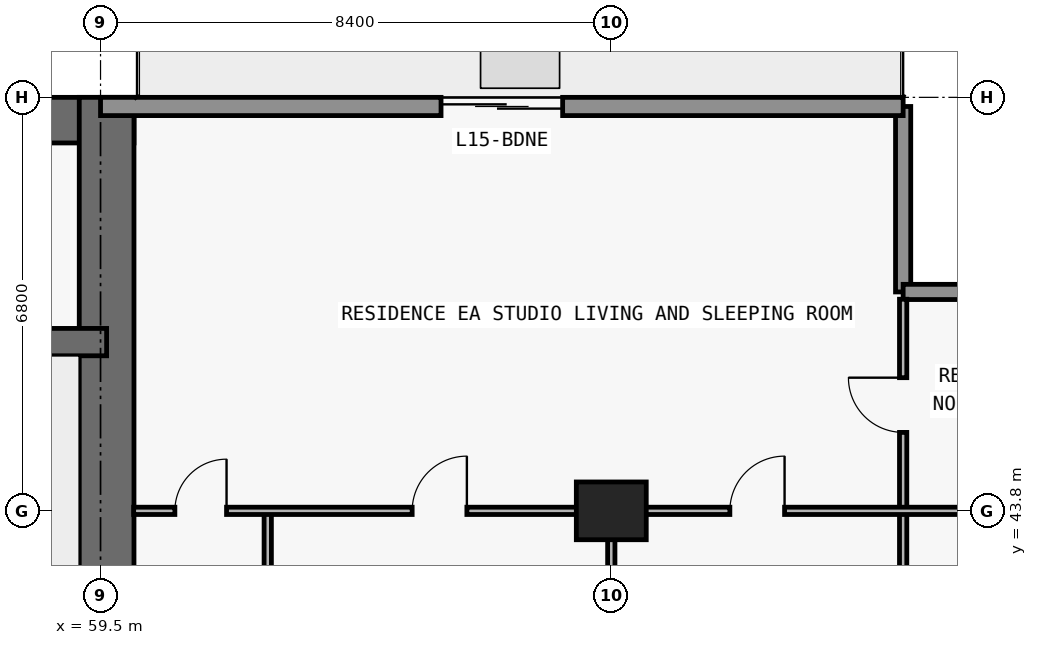
"""IFC4 building model, lengths in metres.
Left out: names, types, materials, properties, quantities, classifications, styles, units other than length and angle.
Written with IfcOpenShell. Run it as: python <this file> out.ifc"""

import sys

from ifc_helpers import new_model, si_unit, direction, frame, frame_2d, origin, origin_2d, place, context, subcontext, project, spatial, rectangle, extrude, element, fill, save


model = new_model("IFC4")
c1 = context("Model", 3, precision=1e-05, world=origin(), true_north=direction((0.0, 1.0)))
c2 = subcontext(c1, "Body", "Model", "MODEL_VIEW")
j1 = project(units=[si_unit("LENGTHUNIT", "METRE"), si_unit("PLANEANGLEUNIT", "RADIAN")], contexts=[c1])
p1 = place(None, origin())
s1 = spatial("IfcSite", under=j1, at=p1, CompositionType="ELEMENT")
p2 = place(p1, origin())
s2 = spatial("IfcBuilding", under=s1, at=p2, CompositionType="ELEMENT")
p3 = place(p2, frame((0.0, 0.0, 59.7)))
s3 = spatial("IfcBuildingStorey", under=s2, at=p3, CompositionType="ELEMENT", Elevation=59.7)
p4 = place(p3, frame((67.9, 43.8, 0.0), z_axis=(0.0, 0.0, 1.0), x_axis=(1.0, 0.0, 0.0)))
e1 = element("IfcColumn", 1, at=p4, inside=s3, PredefinedType="COLUMN", context=c2, shape_type="SweptSolid", body=[
    extrude(rectangle(XDim=1.15, YDim=0.95, at=origin_2d()), origin(), (0.0, 0.0, 1.0), 3.05),
])
p5 = place(p3, frame((17.75, 50.225, 0.0), z_axis=(0.0, 0.0, 1.0), x_axis=(1.0, 0.0, 0.0)))
e2 = element("IfcWall", 2, at=p5, inside=s3, PredefinedType="SHEAR", context=c2, shape_type="SweptSolid", body=[
    extrude(rectangle(XDim=42.3, YDim=0.75, at=frame_2d((21.15, 0.0))), origin(), (0.0, 0.0, 1.0), 3.05),
])
p6 = place(p3, frame((59.6, 36.45, 0.0), z_axis=(0.0, 0.0, 1.0), x_axis=(0.0, 1.0, 0.0)))
e3 = element("IfcWall", 3, at=p6, inside=s3, PredefinedType="SHEAR", context=c2, shape_type="SweptSolid", body=[
    extrude(rectangle(XDim=14.15, YDim=0.9, at=frame_2d((7.075, 0.0))), origin(), (0.0, 0.0, 1.0), 3.05),
])
p7 = place(p3, frame((18.2, 46.575, 0.0), z_axis=(0.0, 0.0, 1.0), x_axis=(1.0, 0.0, 0.0)))
e4 = element("IfcWall", 4, at=p7, inside=s3, PredefinedType="SHEAR", context=c2, shape_type="SweptSolid", body=[
    extrude(rectangle(XDim=41.4, YDim=0.45, at=frame_2d((20.7, 0.0))), origin(), (0.0, 0.0, 1.0), 3.05),
])
p8 = place(p7, frame((7.7, 0.0, 0.0)))
e5 = element("IfcOpeningElement", 5, at=p8, cuts=e4, PredefinedType="OPENING", context=c2, shape_type="SweptSolid", body=[
    extrude(rectangle(XDim=1.0, YDim=2.2, at=frame_2d((0.5, 1.1))), frame((0.0, 0.235, 0.0), z_axis=(0.0, -1.0, 0.0), x_axis=(1.0, 0.0, 0.0)), (0.0, 0.0, 1.0), 0.47),
])
p9 = place(p7, frame((32.725, 0.0, 0.0)))
e6 = element("IfcOpeningElement", 6, at=p9, cuts=e4, PredefinedType="OPENING", context=c2, shape_type="SweptSolid", body=[
    extrude(rectangle(XDim=1.05, YDim=2.15, at=frame_2d((0.525, 1.075))), frame((0.0, 0.235, 0.0), z_axis=(0.0, -1.0, 0.0), x_axis=(1.0, 0.0, 0.0)), (0.0, 0.0, 1.0), 0.47),
])
p10 = place(p3, frame((72.7, 50.45, 0.0), z_axis=(0.0, 0.0, 1.0), x_axis=(0.0, -1.0, 0.0)))
e7 = element("IfcWall", 7, at=p10, inside=s3, PredefinedType="ELEMENTEDWALL", context=c2, shape_type="SweptSolid", body=[
    extrude(rectangle(XDim=3.05, YDim=0.25, at=frame_2d((1.525, 0.0))), origin(), (0.0, 0.0, 1.0), 3.05),
])
p11 = place(p3, frame((72.7, 47.4, 0.0), z_axis=(0.0, 0.0, 1.0), x_axis=(1.0, 0.0, 0.0)))
e8 = element("IfcWall", 8, at=p11, inside=s3, PredefinedType="ELEMENTEDWALL", context=c2, shape_type="SweptSolid", body=[
    extrude(rectangle(XDim=3.45, YDim=0.25, at=frame_2d((1.725, 0.0))), origin(), (0.0, 0.0, 1.0), 3.05),
])
p12 = place(p3, frame((59.5, 50.45, 0.0), z_axis=(0.0, 0.0, 1.0), x_axis=(1.0, 0.0, 0.0)))
e9 = element("IfcWall", 9, at=p12, inside=s3, PredefinedType="STANDARD", context=c2, shape_type="SweptSolid", body=[
    extrude(rectangle(XDim=13.2, YDim=0.3, at=frame_2d((6.6, 0.0))), origin(), (0.0, 0.0, 1.0), 3.05),
])
p13 = place(p12, frame((5.6, 0.0, 0.0)))
e10 = element("IfcOpeningElement", 10, at=p13, cuts=e9, PredefinedType="OPENING", context=c2, shape_type="SweptSolid", body=[
    extrude(rectangle(XDim=2.0, YDim=2.3, at=frame_2d((1.0, 1.15))), frame((0.0, 0.16, 0.0), z_axis=(0.0, -1.0, 0.0), x_axis=(1.0, 0.0, 0.0)), (0.0, 0.0, 1.0), 0.32),
])
p14 = place(p3, frame((62.25, 36.9, 0.0), z_axis=(0.0, 0.0, 1.0), x_axis=(0.0, 1.0, 0.0)))
e11 = element("IfcWall", 11, at=p14, inside=s3, PredefinedType="PARTITIONING", context=c2, shape_type="SweptSolid", body=[
    extrude(rectangle(XDim=6.9, YDim=0.12, at=frame_2d((3.45, 0.0))), origin(), (0.0, 0.0, 1.0), 3.05),
])
p15 = place(p14, frame((1.231, 0.0, 0.0)))
e12 = element("IfcOpeningElement", 12, at=p15, cuts=e11, PredefinedType="OPENING", context=c2, shape_type="SweptSolid", body=[
    extrude(rectangle(XDim=0.85, YDim=2.1, at=frame_2d((0.425, 1.05))), frame((0.0, 0.07, 0.0), z_axis=(0.0, -1.0, 0.0), x_axis=(1.0, 0.0, 0.0)), (0.0, 0.0, 1.0), 0.14),
])
p16 = place(p3, frame((67.9, 36.9, 0.0), z_axis=(0.0, 0.0, 1.0), x_axis=(0.0, 1.0, 0.0)))
e13 = element("IfcWall", 13, at=p16, inside=s3, PredefinedType="PARTITIONING", context=c2, shape_type="SweptSolid", body=[
    extrude(rectangle(XDim=6.9, YDim=0.12, at=frame_2d((3.45, 0.0))), origin(), (0.0, 0.0, 1.0), 2.11),
])
p17 = place(p3, frame((72.7, 36.905, 0.0), z_axis=(0.0, 0.0, 1.0), x_axis=(0.0, 1.0, 0.0)))
e14 = element("IfcWall", 14, at=p17, inside=s3, PredefinedType="PARTITIONING", context=c2, shape_type="SweptSolid", body=[
    extrude(rectangle(XDim=10.375, YDim=0.12, at=frame_2d((5.188, 0.0))), origin(), (0.0, 0.0, 1.0), 3.05),
])
p18 = place(p17, frame((2.998, 0.0, 0.0)))
e15 = element("IfcOpeningElement", 15, at=p18, cuts=e14, PredefinedType="OPENING", context=c2, shape_type="SweptSolid", body=[
    extrude(rectangle(XDim=0.9, YDim=2.15, at=frame_2d((0.45, 1.075))), frame((0.0, 0.07, 0.0), z_axis=(0.0, -1.0, 0.0), x_axis=(1.0, 0.0, 0.0)), (0.0, 0.0, 1.0), 0.14),
])
p19 = place(p17, frame((8.185, 0.0, 0.0)))
e16 = element("IfcOpeningElement", 16, at=p19, cuts=e14, PredefinedType="OPENING", context=c2, shape_type="SweptSolid", body=[
    extrude(rectangle(XDim=0.9, YDim=2.15, at=frame_2d((0.45, 1.075))), frame((0.0, 0.07, 0.0), z_axis=(0.0, -1.0, 0.0), x_axis=(1.0, 0.0, 0.0)), (0.0, 0.0, 1.0), 0.14),
])
p20 = place(p3, frame((60.045, 43.8, 0.0), z_axis=(0.0, 0.0, 1.0), x_axis=(1.0, 0.0, 0.0)))
e17 = element("IfcWall", 17, at=p20, inside=s3, PredefinedType="PARTITIONING", context=c2, shape_type="SweptSolid", body=[
    extrude(rectangle(XDim=15.96, YDim=0.12, at=frame_2d((7.98, 0.0))), origin(), (0.0, 0.0, 1.0), 2.339),
])
p21 = place(p20, frame((9.805, 0.0, 0.0)))
e18 = element("IfcOpeningElement", 18, at=p21, cuts=e17, PredefinedType="OPENING", context=c2, shape_type="SweptSolid", body=[
    extrude(rectangle(XDim=0.9, YDim=2.15, at=frame_2d((0.45, 1.075))), frame((0.0, 0.07, 0.0), z_axis=(0.0, -1.0, 0.0), x_axis=(1.0, 0.0, 0.0)), (0.0, 0.0, 1.0), 0.14),
])
p22 = place(p20, frame((4.58, 0.0, 0.0)))
e19 = element("IfcOpeningElement", 19, at=p22, cuts=e17, PredefinedType="OPENING", context=c2, shape_type="SweptSolid", body=[
    extrude(rectangle(XDim=0.9, YDim=2.15, at=frame_2d((0.45, 1.075))), frame((0.0, 0.07, 0.0), z_axis=(0.0, -1.0, 0.0), x_axis=(1.0, 0.0, 0.0)), (0.0, 0.0, 1.0), 0.14),
])
p23 = place(p20, frame((0.677, 0.0, 0.0)))
e20 = element("IfcOpeningElement", 20, at=p23, cuts=e17, PredefinedType="OPENING", context=c2, shape_type="SweptSolid", body=[
    extrude(rectangle(XDim=0.85, YDim=2.1, at=frame_2d((0.425, 1.05))), frame((0.0, 0.07, 0.0), z_axis=(0.0, -1.0, 0.0), x_axis=(1.0, 0.0, 0.0)), (0.0, 0.0, 1.0), 0.14),
])
p24 = place(p13, origin())
e21 = element("IfcDoor", 21, at=p24, inside=s3, OperationType="DOUBLE_DOOR_SLIDING", PredefinedType="DOOR", context=c2, shape_type="SweptSolid", body=[
    extrude(rectangle(XDim=2.0, YDim=2.3, at=frame_2d((1.0, 1.15))), frame((0.0, 0.025, 0.0), z_axis=(0.0, -1.0, 0.0), x_axis=(1.0, 0.0, 0.0)), (0.0, 0.0, 1.0), 0.05),
])
fill(e10, e21)
p25 = place(p21, origin())
e22 = element("IfcDoor", 22, at=p25, inside=s3, OperationType="SINGLE_SWING_RIGHT", PredefinedType="DOOR", context=c2, shape_type="SweptSolid", body=[
    extrude(rectangle(XDim=0.9, YDim=2.15, at=frame_2d((0.45, 1.075))), frame((0.0, 0.025, 0.0), z_axis=(0.0, -1.0, 0.0), x_axis=(1.0, 0.0, 0.0)), (0.0, 0.0, 1.0), 0.05),
])
fill(e18, e22)
p26 = place(p22, origin())
e23 = element("IfcDoor", 23, at=p26, inside=s3, OperationType="SINGLE_SWING_RIGHT", PredefinedType="DOOR", context=c2, shape_type="SweptSolid", body=[
    extrude(rectangle(XDim=0.9, YDim=2.15, at=frame_2d((0.45, 1.075))), frame((0.0, 0.025, 0.0), z_axis=(0.0, -1.0, 0.0), x_axis=(1.0, 0.0, 0.0)), (0.0, 0.0, 1.0), 0.05),
])
fill(e19, e23)
p27 = place(p23, origin())
e24 = element("IfcDoor", 24, at=p27, inside=s3, OperationType="SINGLE_SWING_RIGHT", PredefinedType="DOOR", context=c2, shape_type="SweptSolid", body=[
    extrude(rectangle(XDim=0.85, YDim=2.1, at=frame_2d((0.425, 1.05))), frame((0.0, 0.025, 0.0), z_axis=(0.0, -1.0, 0.0), x_axis=(1.0, 0.0, 0.0)), (0.0, 0.0, 1.0), 0.05),
])
fill(e20, e24)
p28 = place(p19, origin())
e25 = element("IfcDoor", 25, at=p28, inside=s3, OperationType="SINGLE_SWING_RIGHT", PredefinedType="DOOR", context=c2, shape_type="SweptSolid", body=[
    extrude(rectangle(XDim=0.9, YDim=2.15, at=frame_2d((0.45, 1.075))), frame((0.0, 0.025, 0.0), z_axis=(0.0, -1.0, 0.0), x_axis=(1.0, 0.0, 0.0)), (0.0, 0.0, 1.0), 0.05),
])
fill(e16, e25)
save(model, sys.argv[1])
